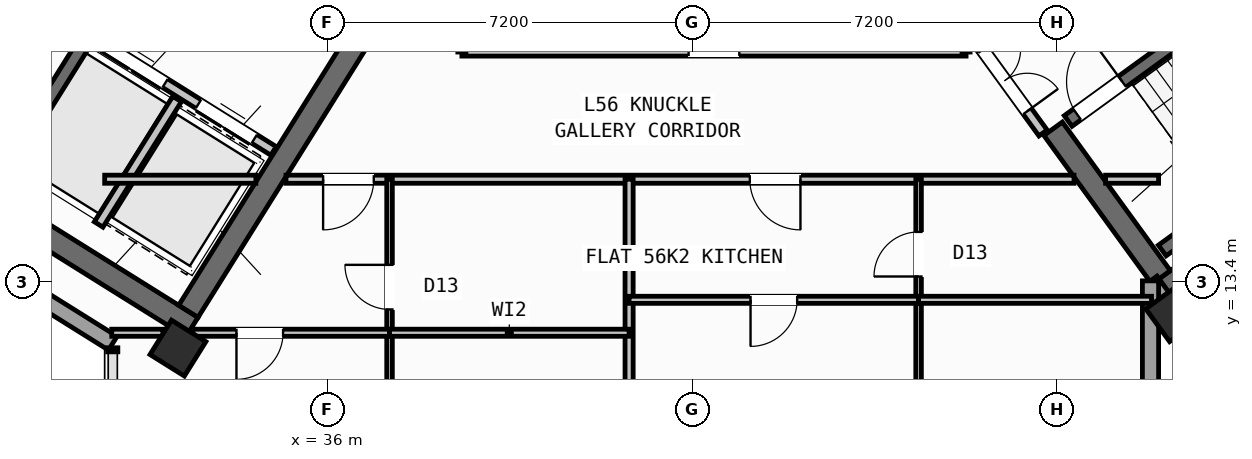
"""IFC4 building model, lengths in metres.
Left out: names, types, materials, properties, quantities, classifications, styles, units other than length and angle.
Written with IfcOpenShell. Run it as: python <this file> out.ifc"""

import sys

from ifc_helpers import new_model, si_unit, direction, frame, frame_2d, origin, origin_2d, place, context, subcontext, project, spatial, rectangle, hollow_rectangle, extrude, source, transform, mapped, element, fill, save


model = new_model("IFC4")
c1 = context("Model", 3, precision=1e-05, world=origin(), true_north=direction((0.0, 1.0)))
c2 = subcontext(c1, "Body", "Model", "MODEL_VIEW")
j1 = project(units=[si_unit("LENGTHUNIT", "METRE"), si_unit("PLANEANGLEUNIT", "RADIAN")], contexts=[c1])
p1 = place(None, origin())
s1 = spatial("IfcSite", under=j1, at=p1, CompositionType="ELEMENT")
p2 = place(p1, origin())
s2 = spatial("IfcBuilding", under=s1, at=p2, CompositionType="ELEMENT")
p3 = place(p2, frame((0.0, 0.0, 222.0)))
s3 = spatial("IfcBuildingStorey", under=s2, at=p3, CompositionType="ELEMENT", Elevation=222.0)
p4 = place(p3, frame((33.324, 12.503, 0.0), z_axis=(0.0, 0.0, 1.0), x_axis=(-0.848043529849, 0.529926571782, 0.0)))
e1 = element("IfcWall", 1, at=p4, inside=s3, PredefinedType="SHEAR", context=c2, shape_type="SweptSolid", body=[
    extrude(rectangle(XDim=13.04, YDim=0.45, at=frame_2d((6.52, 0.0))), origin(), (0.0, 0.0, 1.0), 3.35),
])
p5 = place(p3, frame((36.683, 18.304, 0.0), z_axis=(0.0, 0.0, 1.0), x_axis=(-0.529904039071, -0.848057609704, 0.0)))
e2 = element("IfcWall", 2, at=p5, inside=s3, PredefinedType="SHEAR", context=c2, shape_type="SweptSolid", body=[
    extrude(rectangle(XDim=6.475, YDim=0.45, at=frame_2d((3.238, 0.0))), origin(), (0.0, 0.0, 1.0), 3.35),
])
p6 = place(p3, frame((52.399, 13.169, 0.0), z_axis=(0.0, 0.0, 1.0), x_axis=(0.809022352778, 0.587777877013, 0.0)))
e3 = element("IfcWall", 3, at=p6, inside=s3, PredefinedType="SHEAR", context=c2, shape_type="SweptSolid", body=[
    extrude(rectangle(XDim=12.24, YDim=0.45, at=frame_2d((6.12, 0.0))), origin(), (0.0, 0.0, 1.0), 3.35),
])
p7 = place(p3, frame((52.449, 13.483, 0.0), z_axis=(0.0, 0.0, 1.0), x_axis=(-0.587819244441, 0.808992296542, 0.0)))
e4 = element("IfcWall", 4, at=p7, inside=s3, PredefinedType="SHEAR", context=c2, shape_type="SweptSolid", body=[
    extrude(rectangle(XDim=3.625, YDim=0.45, at=frame_2d((1.812, 0.0))), origin(), (0.0, 0.0, 1.0), 3.35),
])
m1 = source(origin(), c2, "Body", "SweptSolid", [
    extrude(hollow_rectangle(XDim=0.8, YDim=0.8, WallThickness=0.032, at=origin_2d()), origin(), (0.0, 0.0, 1.0), 3.6),
])
for number, where, z_axis, x_axis in (
    (5, (33.046, 12.087, 0.0), (0.0, 0.0, 1.0), (-0.848, 0.53, 0.0)),
    (6, (52.705, 12.773, 0.0), (0.0, 0.0, 1.0), (0.809, 0.588, 0.0)),
):
    element("IfcColumn", number, at=place(p3, frame(where, z_axis=z_axis, x_axis=x_axis)), inside=s3, PredefinedType="COLUMN", context=c2, shape_type="MappedRepresentation", body=[
        mapped(m1, transform((0.0, 0.0, 0.0), scale=1.0)),
    ])
p8 = place(p3, frame((31.76, 12.183, 0.0), z_axis=(0.0, 0.0, 1.0), x_axis=(-0.848047074256, 0.529920899612, 0.0)))
e7 = element("IfcWall", 7, at=p8, inside=s3, PredefinedType="STANDARD", context=c2, shape_type="SweptSolid", body=[
    extrude(rectangle(XDim=30.652, YDim=0.32, at=frame_2d((15.326, 0.0))), origin(), (0.0, 0.0, 1.0), 3.35),
])
p9 = place(p8, frame((15.166, 0.0, 0.0)))
e8 = element("IfcOpeningElement", 8, at=p9, cuts=e7, PredefinedType="OPENING", context=c2, shape_type="SweptSolid", body=[
    extrude(rectangle(XDim=1.2, YDim=2.15, at=frame_2d((0.6, 1.075))), frame((0.0, 0.17, 0.0), z_axis=(0.0, -1.0, 0.0), x_axis=(1.0, 0.0, 0.0)), (0.0, 0.0, 1.0), 0.34),
])
p10 = place(p8, frame((2.24, 0.0, 0.9)))
e9 = element("IfcOpeningElement", 9, at=p10, cuts=e7, PredefinedType="OPENING", context=c2, shape_type="SweptSolid", body=[
    extrude(rectangle(XDim=1.65, YDim=1.45, at=frame_2d((0.825, 0.725))), frame((0.0, 0.17, 0.0), z_axis=(0.0, -1.0, 0.0), x_axis=(1.0, 0.0, 0.0)), (0.0, 0.0, 1.0), 0.34),
])
p11 = place(p8, frame((7.469, 0.0, 0.9)))
e10 = element("IfcOpeningElement", 10, at=p11, cuts=e7, PredefinedType="OPENING", context=c2, shape_type="SweptSolid", body=[
    extrude(rectangle(XDim=1.65, YDim=1.45, at=frame_2d((0.825, 0.725))), frame((0.0, 0.17, 0.0), z_axis=(0.0, -1.0, 0.0), x_axis=(1.0, 0.0, 0.0)), (0.0, 0.0, 1.0), 0.34),
])
p12 = place(p8, frame((12.623, 0.0, 1.0)))
e11 = element("IfcOpeningElement", 11, at=p12, cuts=e7, PredefinedType="OPENING", context=c2, shape_type="SweptSolid", body=[
    extrude(rectangle(XDim=0.9, YDim=1.25, at=frame_2d((0.45, 0.625))), frame((0.0, 0.17, 0.0), z_axis=(0.0, -1.0, 0.0), x_axis=(1.0, 0.0, 0.0)), (0.0, 0.0, 1.0), 0.34),
])
p13 = place(p8, frame((19.583, 0.0, 1.0)))
e12 = element("IfcOpeningElement", 12, at=p13, cuts=e7, PredefinedType="OPENING", context=c2, shape_type="SweptSolid", body=[
    extrude(rectangle(XDim=0.9, YDim=1.25, at=frame_2d((0.45, 0.625))), frame((0.0, 0.17, 0.0), z_axis=(0.0, -1.0, 0.0), x_axis=(1.0, 0.0, 0.0)), (0.0, 0.0, 1.0), 0.34),
])
p14 = place(p8, frame((22.033, 0.0, 1.0)))
e13 = element("IfcOpeningElement", 13, at=p14, cuts=e7, PredefinedType="OPENING", context=c2, shape_type="SweptSolid", body=[
    extrude(rectangle(XDim=0.9, YDim=1.25, at=frame_2d((0.45, 0.625))), frame((0.0, 0.17, 0.0), z_axis=(0.0, -1.0, 0.0), x_axis=(1.0, 0.0, 0.0)), (0.0, 0.0, 1.0), 0.34),
])
p15 = place(p8, frame((27.666, 0.0, 0.9)))
e14 = element("IfcOpeningElement", 14, at=p15, cuts=e7, PredefinedType="OPENING", context=c2, shape_type="SweptSolid", body=[
    extrude(rectangle(XDim=1.35, YDim=1.45, at=frame_2d((0.675, 0.725))), frame((0.0, 0.17, 0.0), z_axis=(0.0, -1.0, 0.0), x_axis=(1.0, 0.0, 0.0)), (0.0, 0.0, 1.0), 0.34),
])
p16 = place(p3, frame((52.937, 12.455, 0.0), z_axis=(0.0, 0.0, 1.0), x_axis=(-0.587706324018, 0.809074333241, 0.0)))
e15 = element("IfcWall", 15, at=p16, inside=s3, PredefinedType="STANDARD", context=c2, shape_type="SweptSolid", body=[
    extrude(rectangle(XDim=1.186, YDim=0.32, at=frame_2d((0.593, 0.0))), origin(), (0.0, 0.0, 1.0), 3.35),
])
p17 = place(p3, frame((52.24, 13.414, 0.0), z_axis=(0.0, 0.0, 1.0), x_axis=(0.0, -1.0, 0.0)))
e16 = element("IfcWall", 16, at=p17, inside=s3, PredefinedType="STANDARD", context=c2, shape_type="SweptSolid", body=[
    extrude(rectangle(XDim=9.948, YDim=0.32, at=frame_2d((4.974, 0.0))), origin(), (0.0, 0.0, 1.0), 3.35),
])
p18 = place(p17, frame((2.643, 0.0, 0.9)))
e17 = element("IfcOpeningElement", 17, at=p18, cuts=e16, PredefinedType="OPENING", context=c2, shape_type="SweptSolid", body=[
    extrude(rectangle(XDim=1.65, YDim=1.45, at=frame_2d((0.825, 0.725))), frame((0.0, 0.17, 0.0), z_axis=(0.0, -1.0, 0.0), x_axis=(1.0, 0.0, 0.0)), (0.0, 0.0, 1.0), 0.34),
])
p19 = place(p17, frame((7.408, 0.0, 0.9)))
e18 = element("IfcOpeningElement", 18, at=p19, cuts=e16, PredefinedType="OPENING", context=c2, shape_type="SweptSolid", body=[
    extrude(rectangle(XDim=1.35, YDim=1.45, at=frame_2d((0.675, 0.725))), frame((0.0, 0.17, 0.0), z_axis=(0.0, -1.0, 0.0), x_axis=(1.0, 0.0, 0.0)), (0.0, 0.0, 1.0), 0.34),
])
p20 = place(p3, frame((31.288, 18.256, 0.0), z_axis=(0.0, 0.0, 1.0), x_axis=(-0.529943379326, -0.848033026897, 0.0)))
e19 = element("IfcWall", 19, at=p20, inside=s3, PredefinedType="SHEAR", context=c2, shape_type="SweptSolid", body=[
    extrude(rectangle(XDim=3.16, YDim=0.26, at=frame_2d((1.58, 0.0))), origin(), (0.0, 0.0, 1.0), 3.35),
])
p21 = place(p3, frame((34.933, 15.978, 0.0), z_axis=(0.0, 0.0, 1.0), x_axis=(-0.848055739377, 0.529907032327, 0.0)))
e20 = element("IfcWall", 20, at=p21, inside=s3, PredefinedType="STANDARD", context=c2, shape_type="SweptSolid", body=[
    extrude(rectangle(XDim=4.298, YDim=0.2, at=frame_2d((2.149, 0.0))), origin(), (0.0, 0.0, 1.0), 3.34),
])
p22 = place(p21, frame((0.448, 0.0, 0.0)))
e21 = element("IfcOpeningElement", 21, at=p22, cuts=e20, PredefinedType="OPENING", context=c2, shape_type="SweptSolid", body=[
    extrude(rectangle(XDim=1.3, YDim=2.2, at=frame_2d((0.65, 1.1))), frame((0.0, 0.11, 0.0), z_axis=(0.0, -1.0, 0.0), x_axis=(1.0, 0.0, 0.0)), (0.0, 0.0, 1.0), 0.22),
])
p23 = place(p21, frame((2.523, 0.0, 0.0)))
e22 = element("IfcOpeningElement", 22, at=p23, cuts=e20, PredefinedType="OPENING", context=c2, shape_type="SweptSolid", body=[
    extrude(rectangle(XDim=1.45, YDim=2.25, at=frame_2d((0.725, 1.125))), frame((0.0, 0.11, 0.0), z_axis=(0.0, -1.0, 0.0), x_axis=(1.0, 0.0, 0.0)), (0.0, 0.0, 1.0), 0.22),
])
p24 = place(p3, frame((33.029, 17.003, 0.0), z_axis=(0.0, 0.0, 1.0), x_axis=(-0.529916267533, -0.848049968695, 0.0)))
e23 = element("IfcWall", 23, at=p24, inside=s3, PredefinedType="STANDARD", context=c2, shape_type="SweptSolid", body=[
    extrude(rectangle(XDim=2.92, YDim=0.2, at=frame_2d((1.46, 0.0))), origin(), (0.0, 0.0, 1.0), 3.34),
])
p25 = place(p3, frame((52.472, 14.013, 0.0), z_axis=(0.0, 0.0, 1.0), x_axis=(0.809028366311, 0.587769599847, 0.0)))
e24 = element("IfcWall", 24, at=p25, inside=s3, PredefinedType="SHEAR", context=c2, shape_type="SweptSolid", body=[
    extrude(rectangle(XDim=7.33, YDim=0.26, at=frame_2d((3.665, 0.0))), origin(), (0.0, 0.0, 1.0), 3.35),
])
p26 = place(p3, frame((50.615, 16.57, 0.0), z_axis=(0.0, 0.0, 1.0), x_axis=(0.809028366311, 0.587769599847, 0.0)))
e25 = element("IfcWall", 25, at=p26, inside=s3, PredefinedType="SHEAR", context=c2, shape_type="SweptSolid", body=[
    extrude(rectangle(XDim=7.33, YDim=0.26, at=frame_2d((3.665, 0.0))), origin(), (0.0, 0.0, 1.0), 3.35),
])
p27 = place(p26, frame((0.22, 0.0, 0.0)))
e26 = element("IfcOpeningElement", 26, at=p27, cuts=e25, PredefinedType="OPENING", context=c2, shape_type="SweptSolid", body=[
    extrude(rectangle(XDim=1.1, YDim=2.1, at=frame_2d((0.55, 1.05))), frame((0.0, 0.14, 0.0), z_axis=(0.0, -1.0, 0.0), x_axis=(1.0, 0.0, 0.0)), (0.0, 0.0, 1.0), 0.28),
])
p28 = place(p3, frame((31.6, 15.42, 0.0), z_axis=(0.0, 0.0, 1.0), x_axis=(1.0, 0.0, 0.0)))
e27 = element("IfcWall", 27, at=p28, inside=s3, PredefinedType="PARTITIONING", context=c2, shape_type="SweptSolid", body=[
    extrude(rectangle(XDim=2.984, YDim=0.16, at=frame_2d((1.492, 0.0))), origin(), (0.0, 0.0, 1.0), 3.34),
])
p29 = place(p3, frame((35.178, 15.42, 0.0), z_axis=(0.0, 0.0, 1.0), x_axis=(1.0, 0.0, 0.0)))
e28 = element("IfcWall", 28, at=p29, inside=s3, PredefinedType="PARTITIONING", context=c2, shape_type="SweptSolid", body=[
    extrude(rectangle(XDim=15.552, YDim=0.16, at=frame_2d((7.776, 0.0))), origin(), (0.0, 0.0, 1.0), 3.34),
])
p30 = place(p29, frame((0.733, 0.0, 0.0)))
e29 = element("IfcOpeningElement", 29, at=p30, cuts=e28, PredefinedType="OPENING", context=c2, shape_type="SweptSolid", body=[
    extrude(rectangle(XDim=1.0, YDim=2.1, at=frame_2d((0.5, 1.05))), frame((0.0, 0.09, 0.0), z_axis=(0.0, -1.0, 0.0), x_axis=(1.0, 0.0, 0.0)), (0.0, 0.0, 1.0), 0.18),
])
p31 = place(p29, frame((9.153, 0.0, 0.0)))
e30 = element("IfcOpeningElement", 30, at=p31, cuts=e28, PredefinedType="OPENING", context=c2, shape_type="SweptSolid", body=[
    extrude(rectangle(XDim=1.0, YDim=2.1, at=frame_2d((0.5, 1.05))), frame((0.0, 0.09, 0.0), z_axis=(0.0, -1.0, 0.0), x_axis=(1.0, 0.0, 0.0)), (0.0, 0.0, 1.0), 0.18),
])
p32 = place(p3, frame((51.354, 15.42, 0.0), z_axis=(0.0, 0.0, 1.0), x_axis=(1.0, 0.0, 0.0)))
e31 = element("IfcWall", 31, at=p32, inside=s3, PredefinedType="PARTITIONING", context=c2, shape_type="SweptSolid", body=[
    extrude(rectangle(XDim=1.046, YDim=0.16, at=frame_2d((0.523, 0.0))), origin(), (0.0, 0.0, 1.0), 3.34),
])
p33 = place(p3, frame((38.65, 17.93, 0.0), z_axis=(0.0, 0.0, 1.0), x_axis=(1.0, 0.0, 0.0)))
e32 = element("IfcWall", 32, at=p33, inside=s3, PredefinedType="PARTITIONING", context=c2, shape_type="SweptSolid", body=[
    extrude(rectangle(XDim=9.95, YDim=0.16, at=frame_2d((4.975, 0.0))), origin(), (0.0, 0.0, 1.0), 3.34),
])
p34 = place(p33, frame((4.475, 0.0, 0.0)))
e33 = element("IfcOpeningElement", 33, at=p34, cuts=e32, PredefinedType="OPENING", context=c2, shape_type="SweptSolid", body=[
    extrude(rectangle(XDim=1.0, YDim=2.1, at=frame_2d((0.5, 1.05))), frame((0.0, 0.09, 0.0), z_axis=(0.0, -1.0, 0.0), x_axis=(1.0, 0.0, 0.0)), (0.0, 0.0, 1.0), 0.18),
])
p35 = place(p3, frame((50.119, 16.333, 0.0), z_axis=(0.0, 0.0, 1.0), x_axis=(-0.587749856981, 0.809042709391, 0.0)))
e34 = element("IfcWall", 34, at=p35, inside=s3, PredefinedType="STANDARD", context=c2, shape_type="SweptSolid", body=[
    extrude(rectangle(XDim=2.96, YDim=0.2, at=frame_2d((1.48, 0.0))), origin(), (0.0, 0.0, 1.0), 3.34),
])
p36 = place(p35, frame((0.53, 0.0, 0.0)))
e35 = element("IfcOpeningElement", 35, at=p36, cuts=e34, PredefinedType="OPENING", context=c2, shape_type="SweptSolid", body=[
    extrude(rectangle(XDim=1.5, YDim=2.15, at=frame_2d((0.75, 1.075))), frame((0.0, 0.11, 0.0), z_axis=(0.0, -1.0, 0.0), x_axis=(1.0, 0.0, 0.0)), (0.0, 0.0, 1.0), 0.22),
])
p37 = place(p3, frame((41.95, 1.96, 0.0), z_axis=(0.0, 0.0, 1.0), x_axis=(0.0, 1.0, 0.0)))
e36 = element("IfcWall", 36, at=p37, inside=s3, PredefinedType="PARTITIONING", context=c2, shape_type="SweptSolid", body=[
    extrude(rectangle(XDim=13.46, YDim=0.16, at=frame_2d((6.73, 0.0))), origin(), (0.0, 0.0, 1.0), 3.34),
])
p38 = place(p3, frame((37.222, 1.96, 0.0), z_axis=(0.0, 0.0, 1.0), x_axis=(0.0, 1.0, 0.0)))
e37 = element("IfcWall", 37, at=p38, inside=s3, PredefinedType="PARTITIONING", context=c2, shape_type="SweptSolid", body=[
    extrude(rectangle(XDim=13.46, YDim=0.11, at=frame_2d((6.73, 0.0))), origin(), (0.0, 0.0, 1.0), 3.34),
])
p39 = place(p38, frame((5.2, 0.0, 0.0)))
e38 = element("IfcOpeningElement", 38, at=p39, cuts=e37, PredefinedType="OPENING", context=c2, shape_type="SweptSolid", body=[
    extrude(rectangle(XDim=0.92, YDim=2.08, at=frame_2d((0.46, 1.04))), frame((0.0, 0.065, 0.0), z_axis=(0.0, -1.0, 0.0), x_axis=(1.0, 0.0, 0.0)), (0.0, 0.0, 1.0), 0.13),
])
p40 = place(p38, frame((10.89, 0.0, 0.0)))
e39 = element("IfcOpeningElement", 39, at=p40, cuts=e37, PredefinedType="OPENING", context=c2, shape_type="SweptSolid", body=[
    extrude(rectangle(XDim=0.88, YDim=2.08, at=frame_2d((0.44, 1.04))), frame((0.0, 0.065, 0.0), z_axis=(0.0, -1.0, 0.0), x_axis=(1.0, 0.0, 0.0)), (0.0, 0.0, 1.0), 0.13),
])
p41 = place(p3, frame((31.74, 12.39, 0.0), z_axis=(0.0, 0.0, 1.0), x_axis=(1.0, 0.0, 0.0)))
e40 = element("IfcWall", 40, at=p41, inside=s3, PredefinedType="PLUMBINGWALL", context=c2, shape_type="SweptSolid", body=[
    extrude(rectangle(XDim=1.01, YDim=0.14, at=frame_2d((0.505, 0.0))), origin(), (0.0, 0.0, 1.0), 3.34),
])
p42 = place(p3, frame((33.339, 12.39, 0.0), z_axis=(0.0, 0.0, 1.0), x_axis=(1.0, 0.0, 0.0)))
e41 = element("IfcWall", 41, at=p42, inside=s3, PredefinedType="PLUMBINGWALL", context=c2, shape_type="SweptSolid", body=[
    extrude(rectangle(XDim=3.883, YDim=0.14, at=frame_2d((1.942, 0.0))), origin(), (0.0, 0.0, 1.0), 2.525),
])
p43 = place(p42, frame((0.863, 0.0, 0.0)))
e42 = element("IfcOpeningElement", 42, at=p43, cuts=e41, PredefinedType="OPENING", context=c2, shape_type="SweptSolid", body=[
    extrude(rectangle(XDim=0.92, YDim=2.08, at=frame_2d((0.46, 1.04))), frame((0.0, 0.08, 0.0), z_axis=(0.0, -1.0, 0.0), x_axis=(1.0, 0.0, 0.0)), (0.0, 0.0, 1.0), 0.16),
])
p44 = place(p3, frame((37.222, 12.39, 0.0), z_axis=(0.0, 0.0, 1.0), x_axis=(1.0, 0.0, 0.0)))
e43 = element("IfcWall", 43, at=p44, inside=s3, PredefinedType="PLUMBINGWALL", context=c2, shape_type="SweptSolid", body=[
    extrude(rectangle(XDim=4.728, YDim=0.14, at=frame_2d((2.364, 0.0))), origin(), (0.0, 0.0, 1.0), 2.525),
])
p45 = place(p3, frame((47.663, 1.96, 0.0), z_axis=(0.0, 0.0, 1.0), x_axis=(0.0, 1.0, 0.0)))
e44 = element("IfcWall", 44, at=p45, inside=s3, PredefinedType="PARTITIONING", context=c2, shape_type="SweptSolid", body=[
    extrude(rectangle(XDim=13.46, YDim=0.11, at=frame_2d((6.73, 0.0))), origin(), (0.0, 0.0, 1.0), 3.34),
])
p46 = place(p45, frame((6.3, 0.0, 0.0)))
e45 = element("IfcOpeningElement", 45, at=p46, cuts=e44, PredefinedType="OPENING", context=c2, shape_type="SweptSolid", body=[
    extrude(rectangle(XDim=0.92, YDim=2.08, at=frame_2d((0.46, 1.04))), frame((0.0, 0.065, 0.0), z_axis=(0.0, -1.0, 0.0), x_axis=(1.0, 0.0, 0.0)), (0.0, 0.0, 1.0), 0.13),
])
p47 = place(p45, frame((11.54, 0.0, 0.0)))
e46 = element("IfcOpeningElement", 46, at=p47, cuts=e44, PredefinedType="OPENING", context=c2, shape_type="SweptSolid", body=[
    extrude(rectangle(XDim=0.88, YDim=2.08, at=frame_2d((0.44, 1.04))), frame((0.0, 0.065, 0.0), z_axis=(0.0, -1.0, 0.0), x_axis=(1.0, 0.0, 0.0)), (0.0, 0.0, 1.0), 0.13),
])
p48 = place(p3, frame((41.95, 13.04, 0.0), z_axis=(0.0, 0.0, 1.0), x_axis=(1.0, 0.0, 0.0)))
e47 = element("IfcWall", 47, at=p48, inside=s3, PredefinedType="PLUMBINGWALL", context=c2, shape_type="SweptSolid", body=[
    extrude(rectangle(XDim=5.713, YDim=0.14, at=frame_2d((2.856, 0.0))), origin(), (0.0, 0.0, 1.0), 3.34),
])
p49 = place(p48, frame((2.396, 0.0, 0.0)))
e48 = element("IfcOpeningElement", 48, at=p49, cuts=e47, PredefinedType="OPENING", context=c2, shape_type="SweptSolid", body=[
    extrude(rectangle(XDim=0.92, YDim=2.08, at=frame_2d((0.46, 1.04))), frame((0.0, 0.08, 0.0), z_axis=(0.0, -1.0, 0.0), x_axis=(1.0, 0.0, 0.0)), (0.0, 0.0, 1.0), 0.16),
])
p50 = place(p3, frame((47.663, 13.04, 0.0), z_axis=(0.0, 0.0, 1.0), x_axis=(1.0, 0.0, 0.0)))
e49 = element("IfcWall", 49, at=p50, inside=s3, PredefinedType="PLUMBINGWALL", context=c2, shape_type="SweptSolid", body=[
    extrude(rectangle(XDim=4.597, YDim=0.14, at=frame_2d((2.298, 0.0))), origin(), (0.0, 0.0, 1.0), 2.525),
])
m2 = source(origin(), c2, "Body", "SweptSolid", [
    extrude(rectangle(XDim=1.3, YDim=2.2, at=frame_2d((0.65, 1.1))), frame((0.0, 0.025, 0.0), z_axis=(0.0, -1.0, 0.0), x_axis=(1.0, 0.0, 0.0)), (0.0, 0.0, 1.0), 0.05),
])
p51 = place(p22, origin())
e50 = element("IfcDoor", 50, at=p51, inside=s3, OperationType="DOUBLE_DOOR_SLIDING", PredefinedType="DOOR", context=c2, shape_type="MappedRepresentation", body=[
    mapped(m2, transform((0.0, 0.0, 0.0), scale=1.0)),
])
fill(e21, e50)
m3 = source(origin(), c2, "Body", "SweptSolid", [
    extrude(rectangle(XDim=1.45, YDim=2.25, at=frame_2d((0.725, 1.125))), frame((0.0, 0.025, 0.0), z_axis=(0.0, -1.0, 0.0), x_axis=(1.0, 0.0, 0.0)), (0.0, 0.0, 1.0), 0.05),
])
p52 = place(p23, origin())
e51 = element("IfcDoor", 51, at=p52, inside=s3, OperationType="DOUBLE_DOOR_SLIDING", PredefinedType="DOOR", context=c2, shape_type="MappedRepresentation", body=[
    mapped(m3, transform((0.0, 0.0, 0.0), scale=1.0)),
])
fill(e22, e51)
m4 = source(origin(), c2, "Body", "SweptSolid", [
    extrude(rectangle(XDim=1.1, YDim=2.1, at=frame_2d((0.55, 1.05))), frame((0.0, 0.025, 0.0), z_axis=(0.0, -1.0, 0.0), x_axis=(1.0, 0.0, 0.0)), (0.0, 0.0, 1.0), 0.05),
])
p53 = place(p27, origin())
e52 = element("IfcDoor", 52, at=p53, inside=s3, OperationType="SINGLE_SWING_RIGHT", PredefinedType="DOOR", context=c2, shape_type="MappedRepresentation", body=[
    mapped(m4, transform((0.0, 0.0, 0.0), scale=1.0)),
])
fill(e26, e52)
m5 = source(origin(), c2, "Body", "SweptSolid", [
    extrude(rectangle(XDim=1.0, YDim=2.1, at=frame_2d((0.5, 1.05))), frame((0.0, 0.025, 0.0), z_axis=(0.0, -1.0, 0.0), x_axis=(1.0, 0.0, 0.0)), (0.0, 0.0, 1.0), 0.05),
])
p54 = place(p34, origin())
e53 = element("IfcDoor", 53, at=p54, inside=s3, OperationType="SINGLE_SWING_LEFT", PredefinedType="DOOR", context=c2, shape_type="MappedRepresentation", body=[
    mapped(m5, transform((0.0, 0.0, 0.0), scale=1.0)),
])
fill(e33, e53)
m6 = source(origin(), c2, "Body", "SweptSolid", [
    extrude(rectangle(XDim=1.5, YDim=2.15, at=frame_2d((0.75, 1.075))), frame((0.0, 0.025, 0.0), z_axis=(0.0, -1.0, 0.0), x_axis=(1.0, 0.0, 0.0)), (0.0, 0.0, 1.0), 0.05),
])
p55 = place(p36, frame((1.5, 0.0, 0.0), z_axis=(0.0, 0.0, 1.0), x_axis=(-1.0, 0.0, 0.0)))
e54 = element("IfcDoor", 54, at=p55, inside=s3, OperationType="DOUBLE_DOOR_SINGLE_SWING", PredefinedType="DOOR", context=c2, shape_type="MappedRepresentation", body=[
    mapped(m6, transform((0.0, 0.0, 0.0), scale=1.0)),
])
fill(e35, e54)
p56 = place(p30, frame((1.0, 0.0, 0.0), z_axis=(0.0, 0.0, 1.0), x_axis=(-1.0, 0.0, 0.0)))
e55 = element("IfcDoor", 55, at=p56, inside=s3, OperationType="SINGLE_SWING_RIGHT", PredefinedType="DOOR", context=c2, shape_type="MappedRepresentation", body=[
    mapped(m5, transform((0.0, 0.0, 0.0), scale=1.0)),
])
fill(e29, e55)
m7 = source(origin(), c2, "Body", "SweptSolid", [
    extrude(rectangle(XDim=0.92, YDim=2.08, at=frame_2d((0.46, 1.04))), frame((0.0, 0.025, 0.0), z_axis=(0.0, -1.0, 0.0), x_axis=(1.0, 0.0, 0.0)), (0.0, 0.0, 1.0), 0.05),
])
p57 = place(p43, frame((0.92, 0.0, 0.0), z_axis=(0.0, 0.0, 1.0), x_axis=(-1.0, 0.0, 0.0)))
e56 = element("IfcDoor", 56, at=p57, inside=s3, OperationType="SINGLE_SWING_RIGHT", PredefinedType="DOOR", context=c2, shape_type="MappedRepresentation", body=[
    mapped(m7, transform((0.0, 0.0, 0.0), scale=1.0)),
])
fill(e42, e56)
m8 = source(origin(), c2, "Body", "SweptSolid", [
    extrude(rectangle(XDim=0.88, YDim=2.08, at=frame_2d((0.44, 1.04))), frame((0.0, 0.025, 0.0), z_axis=(0.0, -1.0, 0.0), x_axis=(1.0, 0.0, 0.0)), (0.0, 0.0, 1.0), 0.05),
])
p58 = place(p40, origin())
e57 = element("IfcDoor", 57, at=p58, inside=s3, OperationType="SINGLE_SWING_RIGHT", PredefinedType="DOOR", context=c2, shape_type="MappedRepresentation", body=[
    mapped(m8, transform((0.0, 0.0, 0.0), scale=1.0)),
])
fill(e39, e57)
p59 = place(p31, frame((1.0, 0.0, 0.0), z_axis=(0.0, 0.0, 1.0), x_axis=(-1.0, 0.0, 0.0)))
e58 = element("IfcDoor", 58, at=p59, inside=s3, OperationType="SINGLE_SWING_LEFT", PredefinedType="DOOR", context=c2, shape_type="MappedRepresentation", body=[
    mapped(m5, transform((0.0, 0.0, 0.0), scale=1.0)),
])
fill(e30, e58)
p60 = place(p49, frame((0.92, 0.0, 0.0), z_axis=(0.0, 0.0, 1.0), x_axis=(-1.0, 0.0, 0.0)))
e59 = element("IfcDoor", 59, at=p60, inside=s3, OperationType="SINGLE_SWING_RIGHT", PredefinedType="DOOR", context=c2, shape_type="MappedRepresentation", body=[
    mapped(m7, transform((0.0, 0.0, 0.0), scale=1.0)),
])
fill(e48, e59)
p61 = place(p47, origin())
e60 = element("IfcDoor", 60, at=p61, inside=s3, OperationType="SINGLE_SWING_LEFT", PredefinedType="DOOR", context=c2, shape_type="MappedRepresentation", body=[
    mapped(m8, transform((0.0, 0.0, 0.0), scale=1.0)),
])
fill(e46, e60)
save(model, sys.argv[1])
